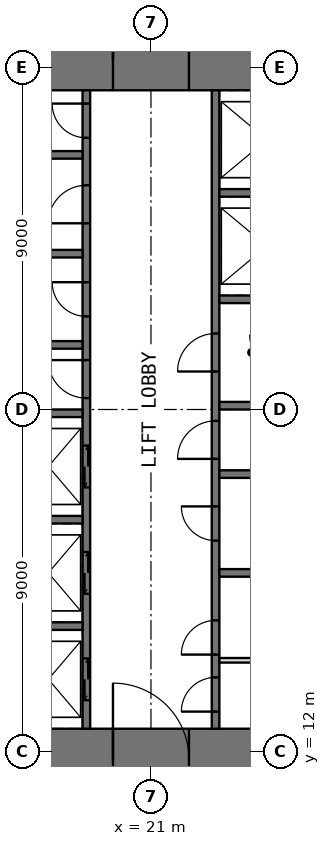
"""IFC4 building model, lengths in metres.
Left out: names, types, materials, properties, quantities, classifications, styles, units other than length and angle.
Written with IfcOpenShell. Run it as: python <this file> out.ifc"""

import sys

from ifc_helpers import new_model, si_unit, direction, frame, frame_2d, origin, place, context, subcontext, project, spatial, rectangle, extrude, element, fill, save


model = new_model("IFC4")
c1 = context("Model", 3, precision=1e-05, world=origin(), true_north=direction((0.0, 1.0)))
c2 = subcontext(c1, "Body", "Model", "MODEL_VIEW")
j1 = project(units=[si_unit("LENGTHUNIT", "METRE"), si_unit("PLANEANGLEUNIT", "RADIAN")], contexts=[c1])
p1 = place(None, origin())
s1 = spatial("IfcSite", under=j1, at=p1, CompositionType="ELEMENT")
p2 = place(p1, origin())
s2 = spatial("IfcBuilding", under=s1, at=p2, CompositionType="ELEMENT")
p3 = place(p2, frame((0.0, 0.0, 112.5)))
s3 = spatial("IfcBuildingStorey", under=s2, at=p3, CompositionType="ELEMENT", Elevation=112.5)
p4 = place(p3, frame((11.0, 11.8, -0.05), z_axis=(0.0, 0.0, 1.0), x_axis=(1.0, 0.0, 0.0)))
e1 = element("IfcWall", 1, at=p4, inside=s3, PredefinedType="SHEAR", context=c2, shape_type="SweptSolid", body=[
    extrude(rectangle(XDim=20.0, YDim=1.6, at=frame_2d((10.0, 0.0))), origin(), (0.0, 0.0, 1.0), 4.0),
])
p5 = place(p4, frame((9.0, 0.0, 0.05)))
e2 = element("IfcOpeningElement", 2, at=p5, cuts=e1, PredefinedType="OPENING", context=c2, shape_type="SweptSolid", body=[
    extrude(rectangle(XDim=2.0, YDim=2.2, at=frame_2d((1.0, 1.1))), frame((0.0, 0.81, 0.0), z_axis=(0.0, -1.0, 0.0), x_axis=(1.0, 0.0, 0.0)), (0.0, 0.0, 1.0), 1.62),
])
p6 = place(p3, frame((11.0, 30.2, -0.05), z_axis=(0.0, 0.0, 1.0), x_axis=(1.0, 0.0, 0.0)))
e3 = element("IfcWall", 3, at=p6, inside=s3, PredefinedType="SHEAR", context=c2, shape_type="SweptSolid", body=[
    extrude(rectangle(XDim=20.0, YDim=1.6, at=frame_2d((10.0, 0.0))), origin(), (0.0, 0.0, 1.0), 4.0),
])
p7 = place(p6, frame((9.0, 0.0, 0.05)))
e4 = element("IfcOpeningElement", 4, at=p7, cuts=e3, PredefinedType="OPENING", context=c2, shape_type="SweptSolid", body=[
    extrude(rectangle(XDim=2.0, YDim=2.2, at=frame_2d((1.0, 1.1))), frame((0.0, 0.81, 0.0), z_axis=(0.0, -1.0, 0.0), x_axis=(1.0, 0.0, 0.0)), (0.0, 0.0, 1.0), 1.62),
])
p8 = place(p3, frame((19.3, 12.6, -0.05), z_axis=(0.0, 0.0, 1.0), x_axis=(0.0, 1.0, 0.0)))
e5 = element("IfcWall", 5, at=p8, inside=s3, PredefinedType="SHEAR", context=c2, shape_type="SweptSolid", body=[
    extrude(rectangle(XDim=16.8, YDim=0.2, at=frame_2d((8.4, 0.0))), origin(), (0.0, 0.0, 1.0), 4.0),
])
p9 = place(p8, frame((8.7, 0.0, 0.05)))
e6 = element("IfcOpeningElement", 6, at=p9, cuts=e5, PredefinedType="OPENING", context=c2, shape_type="SweptSolid", body=[
    extrude(rectangle(XDim=1.0, YDim=2.2, at=frame_2d((0.5, 1.1))), frame((0.0, 0.11, 0.0), z_axis=(0.0, -1.0, 0.0), x_axis=(1.0, 0.0, 0.0)), (0.0, 0.0, 1.0), 0.22),
])
p10 = place(p8, frame((10.85, 0.0, 0.05)))
e7 = element("IfcOpeningElement", 7, at=p10, cuts=e5, PredefinedType="OPENING", context=c2, shape_type="SweptSolid", body=[
    extrude(rectangle(XDim=0.9, YDim=2.2, at=frame_2d((0.45, 1.1))), frame((0.0, 0.11, 0.0), z_axis=(0.0, -1.0, 0.0), x_axis=(1.0, 0.0, 0.0)), (0.0, 0.0, 1.0), 0.22),
])
p11 = place(p8, frame((13.3, 0.0, 0.05)))
e8 = element("IfcOpeningElement", 8, at=p11, cuts=e5, PredefinedType="OPENING", context=c2, shape_type="SweptSolid", body=[
    extrude(rectangle(XDim=1.0, YDim=2.2, at=frame_2d((0.5, 1.1))), frame((0.0, 0.11, 0.0), z_axis=(0.0, -1.0, 0.0), x_axis=(1.0, 0.0, 0.0)), (0.0, 0.0, 1.0), 0.22),
])
p12 = place(p8, frame((15.55, 0.0, 0.05)))
e9 = element("IfcOpeningElement", 9, at=p12, cuts=e5, PredefinedType="OPENING", context=c2, shape_type="SweptSolid", body=[
    extrude(rectangle(XDim=0.9, YDim=2.2, at=frame_2d((0.45, 1.1))), frame((0.0, 0.11, 0.0), z_axis=(0.0, -1.0, 0.0), x_axis=(1.0, 0.0, 0.0)), (0.0, 0.0, 1.0), 0.22),
])
p13 = place(p8, frame((0.75, 0.0, 0.05)))
e10 = element("IfcOpeningElement", 10, at=p13, cuts=e5, PredefinedType="OPENING", context=c2, shape_type="SweptSolid", body=[
    extrude(rectangle(XDim=1.1, YDim=2.2, at=frame_2d((0.55, 1.1))), frame((0.0, 0.11, 0.0), z_axis=(0.0, -1.0, 0.0), x_axis=(1.0, 0.0, 0.0)), (0.0, 0.0, 1.0), 0.22),
])
p14 = place(p8, frame((3.55, 0.0, 0.05)))
e11 = element("IfcOpeningElement", 11, at=p14, cuts=e5, PredefinedType="OPENING", context=c2, shape_type="SweptSolid", body=[
    extrude(rectangle(XDim=1.1, YDim=2.2, at=frame_2d((0.55, 1.1))), frame((0.0, 0.11, 0.0), z_axis=(0.0, -1.0, 0.0), x_axis=(1.0, 0.0, 0.0)), (0.0, 0.0, 1.0), 0.22),
])
p15 = place(p8, frame((6.35, 0.0, 0.05)))
e12 = element("IfcOpeningElement", 12, at=p15, cuts=e5, PredefinedType="OPENING", context=c2, shape_type="SweptSolid", body=[
    extrude(rectangle(XDim=1.1, YDim=2.2, at=frame_2d((0.55, 1.1))), frame((0.0, 0.11, 0.0), z_axis=(0.0, -1.0, 0.0), x_axis=(1.0, 0.0, 0.0)), (0.0, 0.0, 1.0), 0.22),
])
p16 = place(p3, frame((22.7, 12.6, -0.05), z_axis=(0.0, 0.0, 1.0), x_axis=(0.0, 1.0, 0.0)))
e13 = element("IfcWall", 13, at=p16, inside=s3, PredefinedType="SHEAR", context=c2, shape_type="SweptSolid", body=[
    extrude(rectangle(XDim=16.8, YDim=0.2, at=frame_2d((8.4, 0.0))), origin(), (0.0, 0.0, 1.0), 4.0),
])
p17 = place(p16, frame((0.45, 0.0, 0.05)))
e14 = element("IfcOpeningElement", 14, at=p17, cuts=e13, PredefinedType="OPENING", context=c2, shape_type="SweptSolid", body=[
    extrude(rectangle(XDim=0.9, YDim=2.2, at=frame_2d((0.45, 1.1))), frame((0.0, 0.11, 0.0), z_axis=(0.0, -1.0, 0.0), x_axis=(1.0, 0.0, 0.0)), (0.0, 0.0, 1.0), 0.22),
])
p18 = place(p16, frame((7.1, 0.0, 0.05)))
e15 = element("IfcOpeningElement", 15, at=p18, cuts=e13, PredefinedType="OPENING", context=c2, shape_type="SweptSolid", body=[
    extrude(rectangle(XDim=1.0, YDim=2.2, at=frame_2d((0.5, 1.1))), frame((0.0, 0.11, 0.0), z_axis=(0.0, -1.0, 0.0), x_axis=(1.0, 0.0, 0.0)), (0.0, 0.0, 1.0), 0.22),
])
p19 = place(p16, frame((1.95, 0.0, 0.05)))
e16 = element("IfcOpeningElement", 16, at=p19, cuts=e13, PredefinedType="OPENING", context=c2, shape_type="SweptSolid", body=[
    extrude(rectangle(XDim=0.9, YDim=2.2, at=frame_2d((0.45, 1.1))), frame((0.0, 0.11, 0.0), z_axis=(0.0, -1.0, 0.0), x_axis=(1.0, 0.0, 0.0)), (0.0, 0.0, 1.0), 0.22),
])
p20 = place(p16, frame((4.95, 0.0, 0.05)))
e17 = element("IfcOpeningElement", 17, at=p20, cuts=e13, PredefinedType="OPENING", context=c2, shape_type="SweptSolid", body=[
    extrude(rectangle(XDim=0.9, YDim=2.2, at=frame_2d((0.45, 1.1))), frame((0.0, 0.11, 0.0), z_axis=(0.0, -1.0, 0.0), x_axis=(1.0, 0.0, 0.0)), (0.0, 0.0, 1.0), 0.22),
])
p21 = place(p16, frame((9.4, 0.0, 0.05)))
e18 = element("IfcOpeningElement", 18, at=p21, cuts=e13, PredefinedType="OPENING", context=c2, shape_type="SweptSolid", body=[
    extrude(rectangle(XDim=1.0, YDim=2.2, at=frame_2d((0.5, 1.1))), frame((0.0, 0.11, 0.0), z_axis=(0.0, -1.0, 0.0), x_axis=(1.0, 0.0, 0.0)), (0.0, 0.0, 1.0), 0.22),
])
for number, where, z_axis, x_axis in (
    (19, (16.0, 15.3, -0.05), (0.0, 0.0, 1.0), (1.0, 0.0, 0.0)),
    (20, (16.0, 18.1, -0.05), (0.0, 0.0, 1.0), (1.0, 0.0, 0.0)),
    (21, (16.0, 20.9, -0.05), (0.0, 0.0, 1.0), (1.0, 0.0, 0.0)),
    (22, (16.0, 22.7, -0.05), (0.0, 0.0, 1.0), (1.0, 0.0, 0.0)),
    (23, (16.0, 25.1, -0.05), (0.0, 0.0, 1.0), (1.0, 0.0, 0.0)),
    (24, (16.0, 27.7, -0.05), (0.0, 0.0, 1.0), (1.0, 0.0, 0.0)),
    (25, (22.8, 16.7, -0.05), (0.0, 0.0, 1.0), (1.0, 0.0, 0.0)),
    (26, (22.8, 19.3, -0.05), (0.0, 0.0, 1.0), (1.0, 0.0, 0.0)),
    (27, (22.8, 21.1, -0.05), (0.0, 0.0, 1.0), (1.0, 0.0, 0.0)),
    (28, (22.8, 23.9, -0.05), (0.0, 0.0, 1.0), (1.0, 0.0, 0.0)),
    (29, (22.8, 26.7, -0.05), (0.0, 0.0, 1.0), (1.0, 0.0, 0.0)),
):
    element("IfcWall", number, at=place(p3, frame(where, z_axis=z_axis, x_axis=x_axis)), inside=s3, PredefinedType="SHEAR", context=c2, shape_type="SweptSolid", body=[
        extrude(rectangle(XDim=3.2, YDim=0.2, at=frame_2d((1.6, 0.0))), origin(), (0.0, 0.0, 1.0), 4.0),
    ])
p22 = place(p3, frame((22.8, 14.4, 0.0), z_axis=(0.0, 0.0, 1.0), x_axis=(1.0, 0.0, 0.0)))
e30 = element("IfcWall", 30, at=p22, inside=s3, PredefinedType="PARTITIONING", context=c2, shape_type="SweptSolid", body=[
    extrude(rectangle(XDim=3.2, YDim=0.12, at=frame_2d((1.6, 0.0))), origin(), (0.0, 0.0, 1.0), 3.75),
])
p23 = place(p5, origin())
e31 = element("IfcDoor", 31, at=p23, inside=s3, OperationType="DOUBLE_DOOR_SINGLE_SWING", PredefinedType="DOOR", context=c2, shape_type="SweptSolid", body=[
    extrude(rectangle(XDim=2.0, YDim=2.2, at=frame_2d((1.0, 1.1))), frame((0.0, 0.025, 0.0), z_axis=(0.0, -1.0, 0.0), x_axis=(1.0, 0.0, 0.0)), (0.0, 0.0, 1.0), 0.05),
])
fill(e2, e31)
p24 = place(p7, origin())
e32 = element("IfcDoor", 32, at=p24, inside=s3, OperationType="DOUBLE_DOOR_SINGLE_SWING", PredefinedType="DOOR", context=c2, shape_type="SweptSolid", body=[
    extrude(rectangle(XDim=2.0, YDim=2.2, at=frame_2d((1.0, 1.1))), frame((0.0, 0.025, 0.0), z_axis=(0.0, -1.0, 0.0), x_axis=(1.0, 0.0, 0.0)), (0.0, 0.0, 1.0), 0.05),
])
fill(e4, e32)
p25 = place(p17, origin())
e33 = element("IfcDoor", 33, at=p25, inside=s3, OperationType="SINGLE_SWING_LEFT", PredefinedType="DOOR", context=c2, shape_type="SweptSolid", body=[
    extrude(rectangle(XDim=0.9, YDim=2.2, at=frame_2d((0.45, 1.1))), frame((0.0, 0.025, 0.0), z_axis=(0.0, -1.0, 0.0), x_axis=(1.0, 0.0, 0.0)), (0.0, 0.0, 1.0), 0.05),
])
fill(e14, e33)
p26 = place(p9, origin())
e34 = element("IfcDoor", 34, at=p26, inside=s3, OperationType="SINGLE_SWING_RIGHT", PredefinedType="DOOR", context=c2, shape_type="SweptSolid", body=[
    extrude(rectangle(XDim=1.0, YDim=2.2, at=frame_2d((0.5, 1.1))), frame((0.0, 0.025, 0.0), z_axis=(0.0, -1.0, 0.0), x_axis=(1.0, 0.0, 0.0)), (0.0, 0.0, 1.0), 0.05),
])
fill(e6, e34)
p27 = place(p18, origin())
e35 = element("IfcDoor", 35, at=p27, inside=s3, OperationType="SINGLE_SWING_LEFT", PredefinedType="DOOR", context=c2, shape_type="SweptSolid", body=[
    extrude(rectangle(XDim=1.0, YDim=2.2, at=frame_2d((0.5, 1.1))), frame((0.0, 0.025, 0.0), z_axis=(0.0, -1.0, 0.0), x_axis=(1.0, 0.0, 0.0)), (0.0, 0.0, 1.0), 0.05),
])
fill(e15, e35)
p28 = place(p10, origin())
e36 = element("IfcDoor", 36, at=p28, inside=s3, OperationType="SINGLE_SWING_RIGHT", PredefinedType="DOOR", context=c2, shape_type="SweptSolid", body=[
    extrude(rectangle(XDim=0.9, YDim=2.2, at=frame_2d((0.45, 1.1))), frame((0.0, 0.025, 0.0), z_axis=(0.0, -1.0, 0.0), x_axis=(1.0, 0.0, 0.0)), (0.0, 0.0, 1.0), 0.05),
])
fill(e7, e36)
p29 = place(p11, origin())
e37 = element("IfcDoor", 37, at=p29, inside=s3, OperationType="SINGLE_SWING_LEFT", PredefinedType="DOOR", context=c2, shape_type="SweptSolid", body=[
    extrude(rectangle(XDim=1.0, YDim=2.2, at=frame_2d((0.5, 1.1))), frame((0.0, 0.025, 0.0), z_axis=(0.0, -1.0, 0.0), x_axis=(1.0, 0.0, 0.0)), (0.0, 0.0, 1.0), 0.05),
])
fill(e8, e37)
p30 = place(p12, origin())
e38 = element("IfcDoor", 38, at=p30, inside=s3, OperationType="SINGLE_SWING_RIGHT", PredefinedType="DOOR", context=c2, shape_type="SweptSolid", body=[
    extrude(rectangle(XDim=0.9, YDim=2.2, at=frame_2d((0.45, 1.1))), frame((0.0, 0.025, 0.0), z_axis=(0.0, -1.0, 0.0), x_axis=(1.0, 0.0, 0.0)), (0.0, 0.0, 1.0), 0.05),
])
fill(e9, e38)
p31 = place(p19, origin())
e39 = element("IfcDoor", 39, at=p31, inside=s3, OperationType="SINGLE_SWING_LEFT", PredefinedType="DOOR", context=c2, shape_type="SweptSolid", body=[
    extrude(rectangle(XDim=0.9, YDim=2.2, at=frame_2d((0.45, 1.1))), frame((0.0, 0.025, 0.0), z_axis=(0.0, -1.0, 0.0), x_axis=(1.0, 0.0, 0.0)), (0.0, 0.0, 1.0), 0.05),
])
fill(e16, e39)
p32 = place(p20, origin())
e40 = element("IfcDoor", 40, at=p32, inside=s3, OperationType="SINGLE_SWING_RIGHT", PredefinedType="DOOR", context=c2, shape_type="SweptSolid", body=[
    extrude(rectangle(XDim=0.9, YDim=2.2, at=frame_2d((0.45, 1.1))), frame((0.0, 0.025, 0.0), z_axis=(0.0, -1.0, 0.0), x_axis=(1.0, 0.0, 0.0)), (0.0, 0.0, 1.0), 0.05),
])
fill(e17, e40)
p33 = place(p21, origin())
e41 = element("IfcDoor", 41, at=p33, inside=s3, OperationType="SINGLE_SWING_LEFT", PredefinedType="DOOR", context=c2, shape_type="SweptSolid", body=[
    extrude(rectangle(XDim=1.0, YDim=2.2, at=frame_2d((0.5, 1.1))), frame((0.0, 0.025, 0.0), z_axis=(0.0, -1.0, 0.0), x_axis=(1.0, 0.0, 0.0)), (0.0, 0.0, 1.0), 0.05),
])
fill(e18, e41)
p34 = place(p13, origin())
e42 = element("IfcDoor", 42, at=p34, inside=s3, OperationType="DOUBLE_DOOR_SLIDING", PredefinedType="DOOR", context=c2, shape_type="SweptSolid", body=[
    extrude(rectangle(XDim=1.1, YDim=2.2, at=frame_2d((0.55, 1.1))), frame((0.0, 0.025, 0.0), z_axis=(0.0, -1.0, 0.0), x_axis=(1.0, 0.0, 0.0)), (0.0, 0.0, 1.0), 0.05),
])
fill(e10, e42)
p35 = place(p14, origin())
e43 = element("IfcDoor", 43, at=p35, inside=s3, OperationType="DOUBLE_DOOR_SLIDING", PredefinedType="DOOR", context=c2, shape_type="SweptSolid", body=[
    extrude(rectangle(XDim=1.1, YDim=2.2, at=frame_2d((0.55, 1.1))), frame((0.0, 0.025, 0.0), z_axis=(0.0, -1.0, 0.0), x_axis=(1.0, 0.0, 0.0)), (0.0, 0.0, 1.0), 0.05),
])
fill(e11, e43)
p36 = place(p15, origin())
e44 = element("IfcDoor", 44, at=p36, inside=s3, OperationType="DOUBLE_DOOR_SLIDING", PredefinedType="DOOR", context=c2, shape_type="SweptSolid", body=[
    extrude(rectangle(XDim=1.1, YDim=2.2, at=frame_2d((0.55, 1.1))), frame((0.0, 0.025, 0.0), z_axis=(0.0, -1.0, 0.0), x_axis=(1.0, 0.0, 0.0)), (0.0, 0.0, 1.0), 0.05),
])
fill(e12, e44)
save(model, sys.argv[1])
